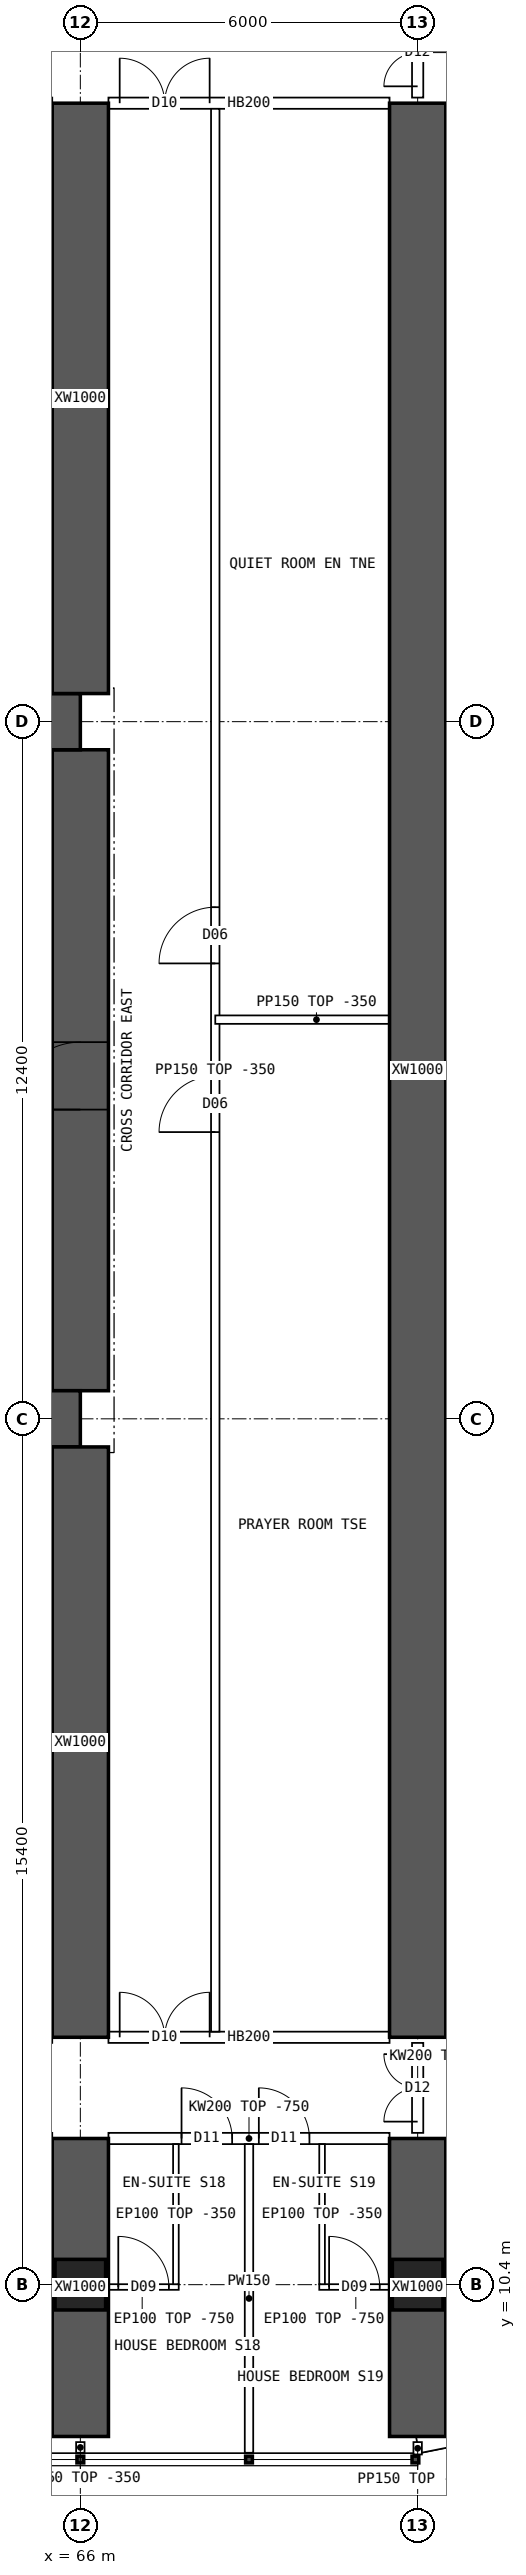
"""IFC4 building model, lengths in metres.
Left out: names, types, materials, properties, quantities, classifications, styles, units other than length and angle.
Written with IfcOpenShell. Run it as: python <this file> out.ifc"""

import sys

from ifc_helpers import new_model, si_unit, direction, frame, frame_2d, origin, origin_2d, place, context, subcontext, project, spatial, polyline, rectangle, hollow_rectangle, outline, extrude, element, fill, save


model = new_model("IFC4")
c1 = context("Model", 3, precision=1e-05, world=origin(), true_north=direction((0.0, 1.0)))
c2 = subcontext(c1, "Body", "Model", "MODEL_VIEW")
j1 = project(units=[si_unit("LENGTHUNIT", "METRE"), si_unit("PLANEANGLEUNIT", "RADIAN")], contexts=[c1])
p1 = place(None, origin())
s1 = spatial("IfcSite", under=j1, at=p1, CompositionType="ELEMENT")
p2 = place(p1, origin())
s2 = spatial("IfcBuilding", under=s1, at=p2, CompositionType="ELEMENT")
p3 = place(p2, frame((0.0, 0.0, 65.2)))
s3 = spatial("IfcBuildingStorey", under=s2, at=p3, CompositionType="ELEMENT", Elevation=65.2)
for number, where, z_axis, x_axis in (
    (1, (66.0, 10.4, 0.0), (0.0, 0.0, 1.0), (1.0, 0.0, 0.0)),
    (2, (72.0, 10.4, 0.0), (0.0, 0.0, 1.0), (1.0, 0.0, 0.0)),
):
    element("IfcColumn", number, at=place(p3, frame(where, z_axis=z_axis, x_axis=x_axis)), inside=s3, PredefinedType="COLUMN", context=c2, shape_type="SweptSolid", body=[
        extrude(hollow_rectangle(XDim=0.9, YDim=0.9, WallThickness=0.09, at=origin_2d()), origin(), (0.0, 0.0, 1.0), 3.75),
    ])
for number, where, z_axis, x_axis in (
    (3, (18.0, 25.8, 0.0), (0.0, 0.0, 1.0), (1.0, 0.0, 0.0)),
    (4, (18.0, 38.2, 0.0), (0.0, 0.0, 1.0), (1.0, 0.0, 0.0)),
):
    element("IfcWall", number, at=place(p3, frame(where, z_axis=z_axis, x_axis=x_axis)), inside=s3, PredefinedType="SHEAR", context=c2, shape_type="SweptSolid", body=[
        extrude(rectangle(XDim=48.0, YDim=1.0, at=frame_2d((24.0, 0.0))), origin(), (0.0, 0.0, 1.0), 3.75),
    ])
p4 = place(p3, frame((66.0, 26.3, 0.0), z_axis=(0.0, 0.0, 1.0), x_axis=(0.0, 1.0, 0.0)))
e5 = element("IfcWall", 5, at=p4, inside=s3, PredefinedType="SHEAR", context=c2, shape_type="SweptSolid", body=[
    extrude(rectangle(XDim=11.4, YDim=1.0, at=frame_2d((5.7, 0.0))), origin(), (0.0, 0.0, 1.0), 3.75),
])
p5 = place(p4, frame((5.0, 0.0, 0.0)))
e6 = element("IfcOpeningElement", 6, at=p5, cuts=e5, PredefinedType="OPENING", context=c2, shape_type="SweptSolid", body=[
    extrude(rectangle(XDim=1.2, YDim=2.1, at=frame_2d((0.6, 1.05))), frame((0.0, 0.51, 0.0), z_axis=(0.0, -1.0, 0.0), x_axis=(1.0, 0.0, 0.0)), (0.0, 0.0, 1.0), 1.02),
])
p6 = place(p3, frame((66.0, 7.7, 0.0), z_axis=(0.0, 0.0, 1.0), x_axis=(0.0, 1.0, 0.0)))
e7 = element("IfcWall", 7, at=p6, inside=s3, PredefinedType="SHEAR", context=c2, shape_type="SweptSolid", body=[
    extrude(rectangle(XDim=5.3, YDim=1.0, at=frame_2d((2.65, 0.0))), origin(), (0.0, 0.0, 1.0), 3.75),
])
for number, where, z_axis, x_axis in (
    (8, (66.0, 14.8, 0.0), (0.0, 0.0, 1.0), (0.0, 1.0, 0.0)),
    (9, (66.0, 38.7, 0.0), (0.0, 0.0, 1.0), (0.0, 1.0, 0.0)),
):
    element("IfcWall", number, at=place(p3, frame(where, z_axis=z_axis, x_axis=x_axis)), inside=s3, PredefinedType="SHEAR", context=c2, shape_type="SweptSolid", body=[
        extrude(rectangle(XDim=10.5, YDim=1.0, at=frame_2d((5.25, 0.0))), origin(), (0.0, 0.0, 1.0), 3.75),
    ])
p7 = place(p3, frame((72.0, 7.7, 0.0), z_axis=(0.0, 0.0, 1.0), x_axis=(0.0, 1.0, 0.0)))
e10 = element("IfcWall", 10, at=p7, inside=s3, PredefinedType="SHEAR", context=c2, shape_type="SweptSolid", body=[
    extrude(rectangle(XDim=5.3, YDim=1.0, at=frame_2d((2.65, 0.0))), origin(), (0.0, 0.0, 1.0), 3.75),
])
p8 = place(p3, frame((72.0, 14.8, 0.0), z_axis=(0.0, 0.0, 1.0), x_axis=(0.0, 1.0, 0.0)))
e11 = element("IfcWall", 11, at=p8, inside=s3, PredefinedType="SHEAR", context=c2, shape_type="SweptSolid", body=[
    extrude(rectangle(XDim=34.4, YDim=1.0, at=frame_2d((17.2, 0.0))), origin(), (0.0, 0.0, 1.0), 3.75),
])
p9 = place(p3, frame((72.0, 7.55, 0.0), z_axis=(0.0, 0.0, 1.0), x_axis=(0.980787251524, 0.195080412259, 0.0)))
e12 = element("IfcWall", 12, at=p9, inside=s3, PredefinedType="SOLIDWALL", context=c2, shape_type="SweptSolid", body=[
    extrude(outline(polyline([(-0.03, -0.15), (3.249, -0.15), (3.189, 0.15), (0.03, 0.15), (-0.03, -0.15)])), origin(), (0.0, 0.0, 1.0), 3.4),
])
p10 = place(p9, frame((0.909, 0.0, 0.9)))
e13 = element("IfcOpeningElement", 13, at=p10, cuts=e12, PredefinedType="OPENING", context=c2, shape_type="SweptSolid", body=[
    extrude(rectangle(XDim=1.4, YDim=1.8, at=frame_2d((0.7, 0.9))), frame((0.0, 0.16, 0.0), z_axis=(0.0, -1.0, 0.0), x_axis=(1.0, 0.0, 0.0)), (0.0, 0.0, 1.0), 0.32),
])
p11 = place(p3, frame((66.5, 13.0, 0.0), z_axis=(0.0, 0.0, 1.0), x_axis=(1.0, 0.0, 0.0)))
e14 = element("IfcWall", 14, at=p11, inside=s3, PredefinedType="SOLIDWALL", context=c2, shape_type="SweptSolid", body=[
    extrude(outline(polyline([(0.0, 0.0), (5.0, 0.0), (5.0, 3.0), (0.0, 3.0), (0.0, 0.0)])), frame((0.0, 0.1, 0.0), z_axis=(0.0, -1.0, 0.0), x_axis=(1.0, 0.0, 0.0)), (0.0, 0.0, 1.0), 0.2),
])
p12 = place(p11, frame((1.3, 0.0, 0.0)))
e15 = element("IfcOpeningElement", 15, at=p12, cuts=e14, PredefinedType="OPENING", context=c2, shape_type="SweptSolid", body=[
    extrude(rectangle(XDim=0.9, YDim=2.1, at=frame_2d((0.45, 1.05))), frame((0.0, 0.11, 0.0), z_axis=(0.0, -1.0, 0.0), x_axis=(1.0, 0.0, 0.0)), (0.0, 0.0, 1.0), 0.22),
])
p13 = place(p11, frame((2.675, 0.0, 0.0)))
e16 = element("IfcOpeningElement", 16, at=p13, cuts=e14, PredefinedType="OPENING", context=c2, shape_type="SweptSolid", body=[
    extrude(rectangle(XDim=0.9, YDim=2.1, at=frame_2d((0.45, 1.05))), frame((0.0, 0.11, 0.0), z_axis=(0.0, -1.0, 0.0), x_axis=(1.0, 0.0, 0.0)), (0.0, 0.0, 1.0), 0.22),
])
p14 = place(p3, frame((66.5, 14.8, 0.0), z_axis=(0.0, 0.0, 1.0), x_axis=(1.0, 0.0, 0.0)))
e17 = element("IfcWall", 17, at=p14, inside=s3, PredefinedType="SOLIDWALL", context=c2, shape_type="SweptSolid", body=[
    extrude(rectangle(XDim=5.0, YDim=0.2, at=frame_2d((2.5, 0.0))), origin(), (0.0, 0.0, 1.0), 3.4),
])
p15 = place(p14, frame((0.2, 0.0, 0.0)))
e18 = element("IfcOpeningElement", 18, at=p15, cuts=e17, PredefinedType="OPENING", context=c2, shape_type="SweptSolid", body=[
    extrude(rectangle(XDim=1.6, YDim=2.1, at=frame_2d((0.8, 1.05))), frame((0.0, 0.11, 0.0), z_axis=(0.0, -1.0, 0.0), x_axis=(1.0, 0.0, 0.0)), (0.0, 0.0, 1.0), 0.22),
])
p16 = place(p3, frame((66.5, 49.2, 0.0), z_axis=(0.0, 0.0, 1.0), x_axis=(1.0, 0.0, 0.0)))
e19 = element("IfcWall", 19, at=p16, inside=s3, PredefinedType="SOLIDWALL", context=c2, shape_type="SweptSolid", body=[
    extrude(rectangle(XDim=5.0, YDim=0.2, at=frame_2d((2.5, 0.0))), origin(), (0.0, 0.0, 1.0), 3.4),
])
p17 = place(p16, frame((0.2, 0.0, 0.0)))
e20 = element("IfcOpeningElement", 20, at=p17, cuts=e19, PredefinedType="OPENING", context=c2, shape_type="SweptSolid", body=[
    extrude(rectangle(XDim=1.6, YDim=2.1, at=frame_2d((0.8, 1.05))), frame((0.0, 0.11, 0.0), z_axis=(0.0, -1.0, 0.0), x_axis=(1.0, 0.0, 0.0)), (0.0, 0.0, 1.0), 0.22),
])
p18 = place(p3, frame((69.0, 7.41, 0.0), z_axis=(0.0, 0.0, 1.0), x_axis=(0.0, 1.0, 0.0)))
e21 = element("IfcWall", 21, at=p18, inside=s3, PredefinedType="PARTITIONING", context=c2, shape_type="SweptSolid", body=[
    extrude(outline(polyline([(0.0, 0.0), (5.49, 0.0), (5.49, 3.0), (5.442, 3.0), (5.44, 3.4), (3.192, 3.4), (3.19, 3.0), (2.792, 3.0), (2.79, 3.4), (0.0, 3.4), (0.0, 0.0)])), frame((0.0, 0.075, 0.0), z_axis=(0.0, -1.0, 0.0), x_axis=(1.0, 0.0, 0.0)), (0.0, 0.0, 1.0), 0.15),
])
p19 = place(p3, frame((67.75, 10.358, 0.0), z_axis=(0.0, 0.0, 1.0), x_axis=(-1.0, 0.0, 0.0)))
e22 = element("IfcWall", 22, at=p19, inside=s3, PredefinedType="PARTITIONING", context=c2, shape_type="SweptSolid", body=[
    extrude(outline(polyline([(0.0, 0.0), (1.3, 0.0), (1.3, 3.0), (0.0, 3.0), (0.0, 0.0)])), frame((0.0, 0.05, 0.0), z_axis=(0.0, -1.0, 0.0), x_axis=(1.0, 0.0, 0.0)), (0.0, 0.0, 1.0), 0.1),
])
p20 = place(p19, frame((0.175, 0.0, 0.0)))
e23 = element("IfcOpeningElement", 23, at=p20, cuts=e22, PredefinedType="OPENING", context=c2, shape_type="SweptSolid", body=[
    extrude(rectangle(XDim=0.9, YDim=2.1, at=frame_2d((0.45, 1.05))), frame((0.0, 0.06, 0.0), z_axis=(0.0, -1.0, 0.0), x_axis=(1.0, 0.0, 0.0)), (0.0, 0.0, 1.0), 0.12),
])
p21 = place(p3, frame((67.7, 10.408, 0.0), z_axis=(0.0, 0.0, 1.0), x_axis=(0.0, 1.0, 0.0)))
e24 = element("IfcWall", 24, at=p21, inside=s3, PredefinedType="PARTITIONING", context=c2, shape_type="SweptSolid", body=[
    extrude(outline(polyline([(0.0, 0.0), (2.492, 0.0), (2.492, 3.0), (2.444, 3.0), (2.442, 3.4), (0.194, 3.4), (0.192, 3.0), (0.0, 3.0), (0.0, 0.0)])), frame((0.0, 0.05, 0.0), z_axis=(0.0, -1.0, 0.0), x_axis=(1.0, 0.0, 0.0)), (0.0, 0.0, 1.0), 0.1),
])
p22 = place(p3, frame((71.55, 10.358, 0.0), z_axis=(0.0, 0.0, 1.0), x_axis=(-1.0, 0.0, 0.0)))
e25 = element("IfcWall", 25, at=p22, inside=s3, PredefinedType="PARTITIONING", context=c2, shape_type="SweptSolid", body=[
    extrude(outline(polyline([(0.0, 0.0), (1.3, 0.0), (1.3, 3.0), (0.0, 3.0), (0.0, 0.0)])), frame((0.0, 0.05, 0.0), z_axis=(0.0, -1.0, 0.0), x_axis=(1.0, 0.0, 0.0)), (0.0, 0.0, 1.0), 0.1),
])
p23 = place(p22, frame((0.225, 0.0, 0.0)))
e26 = element("IfcOpeningElement", 26, at=p23, cuts=e25, PredefinedType="OPENING", context=c2, shape_type="SweptSolid", body=[
    extrude(rectangle(XDim=0.9, YDim=2.1, at=frame_2d((0.45, 1.05))), frame((0.0, 0.06, 0.0), z_axis=(0.0, -1.0, 0.0), x_axis=(1.0, 0.0, 0.0)), (0.0, 0.0, 1.0), 0.12),
])
p24 = place(p3, frame((70.3, 10.408, 0.0), z_axis=(0.0, 0.0, 1.0), x_axis=(0.0, 1.0, 0.0)))
e27 = element("IfcWall", 27, at=p24, inside=s3, PredefinedType="PARTITIONING", context=c2, shape_type="SweptSolid", body=[
    extrude(outline(polyline([(0.0, 0.0), (2.492, 0.0), (2.492, 3.0), (2.444, 3.0), (2.442, 3.4), (0.194, 3.4), (0.192, 3.0), (0.0, 3.0), (0.0, 0.0)])), frame((0.0, 0.05, 0.0), z_axis=(0.0, -1.0, 0.0), x_axis=(1.0, 0.0, 0.0)), (0.0, 0.0, 1.0), 0.1),
])
p25 = place(p3, frame((68.4, 14.9, 0.0), z_axis=(0.0, 0.0, 1.0), x_axis=(0.0, 1.0, 0.0)))
e28 = element("IfcWall", 28, at=p25, inside=s3, PredefinedType="PARTITIONING", context=c2, shape_type="SweptSolid", body=[
    extrude(rectangle(XDim=34.2, YDim=0.15, at=frame_2d((17.1, 0.0))), origin(), (0.0, 0.0, 1.0), 3.4),
])
p26 = place(p25, frame((16.0, 0.0, 0.0)))
e29 = element("IfcOpeningElement", 29, at=p26, cuts=e28, PredefinedType="OPENING", context=c2, shape_type="SweptSolid", body=[
    extrude(rectangle(XDim=1.0, YDim=2.1, at=frame_2d((0.5, 1.05))), frame((0.0, 0.085, 0.0), z_axis=(0.0, -1.0, 0.0), x_axis=(1.0, 0.0, 0.0)), (0.0, 0.0, 1.0), 0.17),
])
p27 = place(p25, frame((19.0, 0.0, 0.0)))
e30 = element("IfcOpeningElement", 30, at=p27, cuts=e28, PredefinedType="OPENING", context=c2, shape_type="SweptSolid", body=[
    extrude(rectangle(XDim=1.0, YDim=2.1, at=frame_2d((0.5, 1.05))), frame((0.0, 0.085, 0.0), z_axis=(0.0, -1.0, 0.0), x_axis=(1.0, 0.0, 0.0)), (0.0, 0.0, 1.0), 0.17),
])
p28 = place(p3, frame((68.4, 32.9, 0.0), z_axis=(0.0, 0.0, 1.0), x_axis=(1.0, 0.0, 0.0)))
e31 = element("IfcWall", 31, at=p28, inside=s3, PredefinedType="PARTITIONING", context=c2, shape_type="SweptSolid", body=[
    extrude(rectangle(XDim=3.6, YDim=0.15, at=frame_2d((1.8, 0.0))), origin(), (0.0, 0.0, 1.0), 3.4),
])
p29 = place(p3, frame((72.075, 30.85, 0.0), z_axis=(0.0, 0.0, 1.0), x_axis=(1.0, 0.0, 0.0)))
e32 = element("IfcWall", 32, at=p29, inside=s3, PredefinedType="PARTITIONING", context=c2, shape_type="SweptSolid", body=[
    extrude(outline(polyline([(0.0, 0.0), (8.02, 0.0), (8.02, 3.4), (6.227, 3.4), (6.225, 2.95), (5.627, 2.95), (5.625, 3.4), (0.0, 3.4), (0.0, 0.0)])), frame((0.0, 0.075, 0.0), z_axis=(0.0, -1.0, 0.0), x_axis=(1.0, 0.0, 0.0)), (0.0, 0.0, 1.0), 0.15),
])
p30 = place(p3, frame((72.0, 13.1, 0.0), z_axis=(0.0, 0.0, 1.0), x_axis=(0.0, 1.0, 0.0)))
e33 = element("IfcWall", 33, at=p30, inside=s3, PredefinedType="SOLIDWALL", context=c2, shape_type="SweptSolid", body=[
    extrude(outline(polyline([(0.0, 0.0), (1.6, 0.0), (1.6, 2.95), (0.0, 2.95), (0.0, 0.0)])), frame((0.0, 0.1, 0.0), z_axis=(0.0, -1.0, 0.0), x_axis=(1.0, 0.0, 0.0)), (0.0, 0.0, 1.0), 0.2),
])
p31 = place(p30, frame((0.2, 0.0, 0.0)))
e34 = element("IfcOpeningElement", 34, at=p31, cuts=e33, PredefinedType="OPENING", context=c2, shape_type="SweptSolid", body=[
    extrude(rectangle(XDim=1.2, YDim=2.1, at=frame_2d((0.6, 1.05))), frame((0.0, 0.11, 0.0), z_axis=(0.0, -1.0, 0.0), x_axis=(1.0, 0.0, 0.0)), (0.0, 0.0, 1.0), 0.22),
])
p32 = place(p3, frame((72.0, 49.3, 0.0), z_axis=(0.0, 0.0, 1.0), x_axis=(0.0, 1.0, 0.0)))
e35 = element("IfcWall", 35, at=p32, inside=s3, PredefinedType="SOLIDWALL", context=c2, shape_type="SweptSolid", body=[
    extrude(outline(polyline([(0.0, 0.0), (1.6, 0.0), (1.6, 2.95), (0.0, 2.95), (0.0, 0.0)])), frame((0.0, 0.1, 0.0), z_axis=(0.0, -1.0, 0.0), x_axis=(1.0, 0.0, 0.0)), (0.0, 0.0, 1.0), 0.2),
])
p33 = place(p32, frame((0.2, 0.0, 0.0)))
e36 = element("IfcOpeningElement", 36, at=p33, cuts=e35, PredefinedType="OPENING", context=c2, shape_type="SweptSolid", body=[
    extrude(rectangle(XDim=1.2, YDim=2.1, at=frame_2d((0.6, 1.05))), frame((0.0, 0.11, 0.0), z_axis=(0.0, -1.0, 0.0), x_axis=(1.0, 0.0, 0.0)), (0.0, 0.0, 1.0), 0.22),
])
p34 = place(p3, frame((66.0, 7.6, 0.0), z_axis=(0.0, 0.0, 1.0), x_axis=(0.0, -1.0, 0.0)))
e37 = element("IfcWall", 37, at=p34, inside=s3, PredefinedType="PARTITIONING", context=c2, shape_type="SweptSolid", body=[
    extrude(rectangle(XDim=0.19, YDim=0.15, at=frame_2d((0.095, 0.0))), origin(), (0.0, 0.0, 1.0), 3.4),
])
p35 = place(p3, frame((72.0, 7.6, 0.0), z_axis=(0.0, 0.0, 1.0), x_axis=(0.0, -1.0, 0.0)))
e38 = element("IfcWall", 38, at=p35, inside=s3, PredefinedType="PARTITIONING", context=c2, shape_type="SweptSolid", body=[
    extrude(rectangle(XDim=0.22, YDim=0.15, at=frame_2d((0.11, 0.0))), origin(), (0.0, 0.0, 1.0), 3.4),
])
p36 = place(p5, origin())
e39 = element("IfcDoor", 39, at=p36, inside=s3, OperationType="SINGLE_SWING_LEFT", PredefinedType="DOOR", context=c2, shape_type="SweptSolid", body=[
    extrude(rectangle(XDim=1.2, YDim=2.1, at=frame_2d((0.6, 1.05))), frame((0.0, 0.025, 0.0), z_axis=(0.0, -1.0, 0.0), x_axis=(1.0, 0.0, 0.0)), (0.0, 0.0, 1.0), 0.05),
])
fill(e6, e39)
p37 = place(p15, origin())
e40 = element("IfcDoor", 40, at=p37, inside=s3, OperationType="DOUBLE_DOOR_SINGLE_SWING", PredefinedType="DOOR", context=c2, shape_type="SweptSolid", body=[
    extrude(rectangle(XDim=1.6, YDim=2.1, at=frame_2d((0.8, 1.05))), frame((0.0, 0.025, 0.0), z_axis=(0.0, -1.0, 0.0), x_axis=(1.0, 0.0, 0.0)), (0.0, 0.0, 1.0), 0.05),
])
fill(e18, e40)
p38 = place(p17, origin())
e41 = element("IfcDoor", 41, at=p38, inside=s3, OperationType="DOUBLE_DOOR_SINGLE_SWING", PredefinedType="DOOR", context=c2, shape_type="SweptSolid", body=[
    extrude(rectangle(XDim=1.6, YDim=2.1, at=frame_2d((0.8, 1.05))), frame((0.0, 0.025, 0.0), z_axis=(0.0, -1.0, 0.0), x_axis=(1.0, 0.0, 0.0)), (0.0, 0.0, 1.0), 0.05),
])
fill(e20, e41)
p39 = place(p20, origin())
e42 = element("IfcDoor", 42, at=p39, inside=s3, OperationType="SINGLE_SWING_RIGHT", PredefinedType="DOOR", context=c2, shape_type="SweptSolid", body=[
    extrude(rectangle(XDim=0.9, YDim=2.1, at=frame_2d((0.45, 1.05))), frame((0.0, 0.025, 0.0), z_axis=(0.0, -1.0, 0.0), x_axis=(1.0, 0.0, 0.0)), (0.0, 0.0, 1.0), 0.05),
])
fill(e23, e42)
p40 = place(p12, origin())
e43 = element("IfcDoor", 43, at=p40, inside=s3, OperationType="SINGLE_SWING_LEFT", PredefinedType="DOOR", context=c2, shape_type="SweptSolid", body=[
    extrude(rectangle(XDim=0.9, YDim=2.1, at=frame_2d((0.45, 1.05))), frame((0.0, 0.025, 0.0), z_axis=(0.0, -1.0, 0.0), x_axis=(1.0, 0.0, 0.0)), (0.0, 0.0, 1.0), 0.05),
])
fill(e15, e43)
p41 = place(p23, origin())
e44 = element("IfcDoor", 44, at=p41, inside=s3, OperationType="SINGLE_SWING_RIGHT", PredefinedType="DOOR", context=c2, shape_type="SweptSolid", body=[
    extrude(rectangle(XDim=0.9, YDim=2.1, at=frame_2d((0.45, 1.05))), frame((0.0, 0.025, 0.0), z_axis=(0.0, -1.0, 0.0), x_axis=(1.0, 0.0, 0.0)), (0.0, 0.0, 1.0), 0.05),
])
fill(e26, e44)
p42 = place(p13, origin())
e45 = element("IfcDoor", 45, at=p42, inside=s3, OperationType="SINGLE_SWING_LEFT", PredefinedType="DOOR", context=c2, shape_type="SweptSolid", body=[
    extrude(rectangle(XDim=0.9, YDim=2.1, at=frame_2d((0.45, 1.05))), frame((0.0, 0.025, 0.0), z_axis=(0.0, -1.0, 0.0), x_axis=(1.0, 0.0, 0.0)), (0.0, 0.0, 1.0), 0.05),
])
fill(e16, e45)
p43 = place(p26, origin())
e46 = element("IfcDoor", 46, at=p43, inside=s3, OperationType="SINGLE_SWING_LEFT", PredefinedType="DOOR", context=c2, shape_type="SweptSolid", body=[
    extrude(rectangle(XDim=1.0, YDim=2.1, at=frame_2d((0.5, 1.05))), frame((0.0, 0.025, 0.0), z_axis=(0.0, -1.0, 0.0), x_axis=(1.0, 0.0, 0.0)), (0.0, 0.0, 1.0), 0.05),
])
fill(e29, e46)
p44 = place(p27, origin())
e47 = element("IfcDoor", 47, at=p44, inside=s3, OperationType="SINGLE_SWING_LEFT", PredefinedType="DOOR", context=c2, shape_type="SweptSolid", body=[
    extrude(rectangle(XDim=1.0, YDim=2.1, at=frame_2d((0.5, 1.05))), frame((0.0, 0.025, 0.0), z_axis=(0.0, -1.0, 0.0), x_axis=(1.0, 0.0, 0.0)), (0.0, 0.0, 1.0), 0.05),
])
fill(e30, e47)
p45 = place(p31, origin())
e48 = element("IfcDoor", 48, at=p45, inside=s3, OperationType="DOUBLE_DOOR_SINGLE_SWING", PredefinedType="DOOR", context=c2, shape_type="SweptSolid", body=[
    extrude(rectangle(XDim=1.2, YDim=2.1, at=frame_2d((0.6, 1.05))), frame((0.0, 0.025, 0.0), z_axis=(0.0, -1.0, 0.0), x_axis=(1.0, 0.0, 0.0)), (0.0, 0.0, 1.0), 0.05),
])
fill(e34, e48)
p46 = place(p33, origin())
e49 = element("IfcDoor", 49, at=p46, inside=s3, OperationType="DOUBLE_DOOR_SINGLE_SWING", PredefinedType="DOOR", context=c2, shape_type="SweptSolid", body=[
    extrude(rectangle(XDim=1.2, YDim=2.1, at=frame_2d((0.6, 1.05))), frame((0.0, 0.025, 0.0), z_axis=(0.0, -1.0, 0.0), x_axis=(1.0, 0.0, 0.0)), (0.0, 0.0, 1.0), 0.05),
])
fill(e36, e49)
save(model, sys.argv[1])
